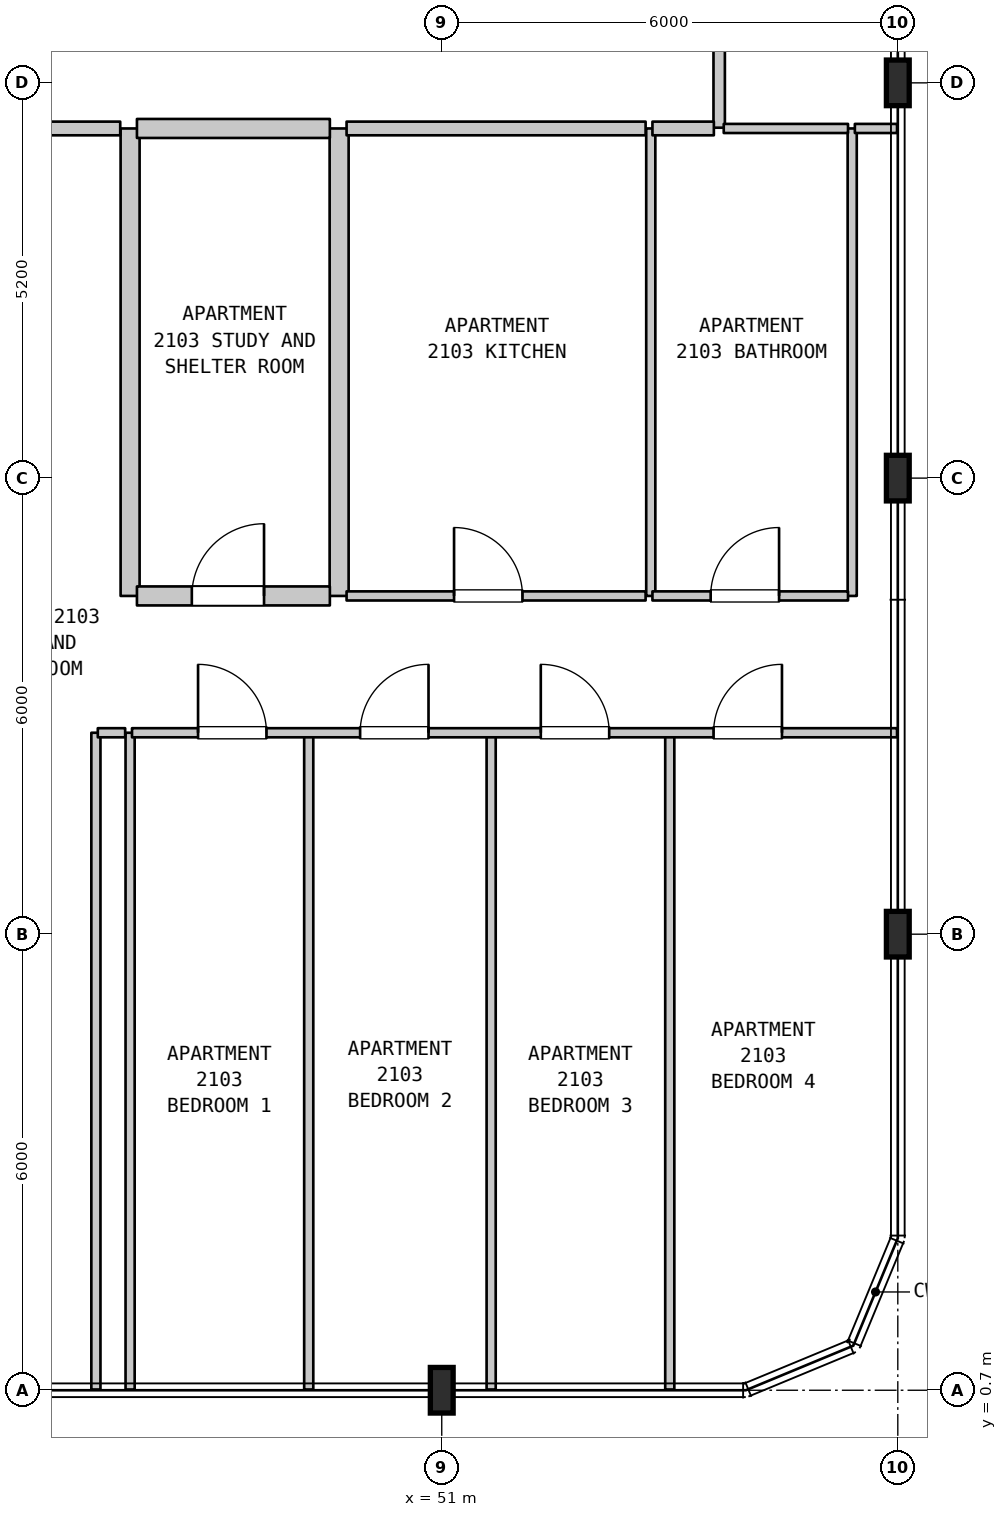
"""IFC4 building model, lengths in metres.
Left out: names, types, materials, properties, quantities, classifications, styles, units other than length and angle.
Written with IfcOpenShell. Run it as: python <this file> out.ifc"""

import sys

from ifc_helpers import new_model, si_unit, direction, frame, frame_2d, origin, origin_2d, place, context, subcontext, project, spatial, rectangle, i_section, extrude, element, fill, save


model = new_model("IFC4")
c1 = context("Model", 3, precision=1e-05, world=origin(), true_north=direction((0.0, 1.0)))
c2 = subcontext(c1, "Body", "Model", "MODEL_VIEW")
j1 = project(units=[si_unit("LENGTHUNIT", "METRE"), si_unit("PLANEANGLEUNIT", "RADIAN")], contexts=[c1])
p1 = place(None, origin())
s1 = spatial("IfcSite", under=j1, at=p1, CompositionType="ELEMENT")
p2 = place(p1, origin())
s2 = spatial("IfcBuilding", under=s1, at=p2, CompositionType="ELEMENT")
p3 = place(p2, frame((0.0, 0.0, 90.9)))
s3 = spatial("IfcBuildingStorey", under=s2, at=p3, CompositionType="ELEMENT", Elevation=90.9)
for number, where, z_axis, x_axis in (
    (1, (51.0, 0.7, 0.0), (0.0, 0.0, 1.0), (1.0, 0.0, 0.0)),
    (2, (57.0, 6.7, 0.0), (0.0, 0.0, 1.0), (1.0, 0.0, 0.0)),
    (3, (57.0, 12.7, 0.0), (0.0, 0.0, 1.0), (1.0, 0.0, 0.0)),
    (4, (57.0, 17.9, 0.0), (0.0, 0.0, 1.0), (1.0, 0.0, 0.0)),
):
    element("IfcColumn", number, at=place(p3, frame(where, z_axis=z_axis, x_axis=x_axis)), inside=s3, PredefinedType="COLUMN", context=c2, shape_type="SweptSolid", body=[
        extrude(i_section(OverallWidth=0.3, OverallDepth=0.6, WebThickness=0.015, FlangeThickness=0.03, FilletRadius=0.027, at=origin_2d()), origin(), (0.0, 0.0, 1.0), 3.7),
    ])
for number, where, z_axis, x_axis in (
    (5, (46.45, 0.71, 0.0), (0.0, 0.0, 1.0), (0.0, 1.0, 0.0)),
    (6, (46.9, 0.71, 0.0), (0.0, 0.0, 1.0), (0.0, 1.0, 0.0)),
):
    element("IfcWall", number, at=place(p3, frame(where, z_axis=z_axis, x_axis=x_axis)), inside=s3, PredefinedType="PARTITIONING", context=c2, shape_type="SweptSolid", body=[
        extrude(rectangle(XDim=8.64, YDim=0.12, at=frame_2d((4.32, 0.0))), origin(), (0.0, 0.0, 1.0), 3.385),
    ])
p4 = place(p3, frame((46.9, 11.15, 0.0), z_axis=(0.0, 0.0, 1.0), x_axis=(0.0, 1.0, 0.0)))
e7 = element("IfcWall", 7, at=p4, inside=s3, PredefinedType="STANDARD", context=c2, shape_type="SweptSolid", body=[
    extrude(rectangle(XDim=6.15, YDim=0.25, at=frame_2d((3.075, 0.0))), origin(), (0.0, 0.0, 1.0), 3.385),
])
p5 = place(p3, frame((49.25, 0.71, 0.0), z_axis=(0.0, 0.0, 1.0), x_axis=(0.0, 1.0, 0.0)))
e8 = element("IfcWall", 8, at=p5, inside=s3, PredefinedType="PARTITIONING", context=c2, shape_type="SweptSolid", body=[
    extrude(rectangle(XDim=8.64, YDim=0.12, at=frame_2d((4.32, 0.0))), origin(), (0.0, 0.0, 1.0), 3.385),
])
p6 = place(p3, frame((49.65, 11.15, 0.0), z_axis=(0.0, 0.0, 1.0), x_axis=(0.0, 1.0, 0.0)))
e9 = element("IfcWall", 9, at=p6, inside=s3, PredefinedType="STANDARD", context=c2, shape_type="SweptSolid", body=[
    extrude(rectangle(XDim=6.15, YDim=0.25, at=frame_2d((3.075, 0.0))), origin(), (0.0, 0.0, 1.0), 3.385),
])
p7 = place(p3, frame((51.65, 0.71, 0.0), z_axis=(0.0, 0.0, 1.0), x_axis=(0.0, 1.0, 0.0)))
e10 = element("IfcWall", 10, at=p7, inside=s3, PredefinedType="PARTITIONING", context=c2, shape_type="SweptSolid", body=[
    extrude(rectangle(XDim=8.64, YDim=0.12, at=frame_2d((4.32, 0.0))), origin(), (0.0, 0.0, 1.0), 3.385),
])
p8 = place(p3, frame((53.75, 11.15, 0.0), z_axis=(0.0, 0.0, 1.0), x_axis=(0.0, 1.0, 0.0)))
e11 = element("IfcWall", 11, at=p8, inside=s3, PredefinedType="PARTITIONING", context=c2, shape_type="SweptSolid", body=[
    extrude(rectangle(XDim=6.15, YDim=0.12, at=frame_2d((3.075, 0.0))), origin(), (0.0, 0.0, 1.0), 3.385),
])
p9 = place(p3, frame((54.0, 0.71, 0.0), z_axis=(0.0, 0.0, 1.0), x_axis=(0.0, 1.0, 0.0)))
e12 = element("IfcWall", 12, at=p9, inside=s3, PredefinedType="PARTITIONING", context=c2, shape_type="SweptSolid", body=[
    extrude(rectangle(XDim=8.64, YDim=0.12, at=frame_2d((4.32, 0.0))), origin(), (0.0, 0.0, 1.0), 3.385),
])
p10 = place(p3, frame((54.65, 17.31, 0.0), z_axis=(0.0, 0.0, 1.0), x_axis=(0.0, 1.0, 0.0)))
e13 = element("IfcWall", 13, at=p10, inside=s3, PredefinedType="STANDARD", context=c2, shape_type="SweptSolid", body=[
    extrude(rectangle(XDim=2.19, YDim=0.15, at=frame_2d((1.095, 0.0))), origin(), (0.0, 0.0, 1.0), 3.385),
])
p11 = place(p3, frame((56.4, 11.15, 0.0), z_axis=(0.0, 0.0, 1.0), x_axis=(0.0, 1.0, 0.0)))
e14 = element("IfcWall", 14, at=p11, inside=s3, PredefinedType="PARTITIONING", context=c2, shape_type="SweptSolid", body=[
    extrude(rectangle(XDim=6.15, YDim=0.12, at=frame_2d((3.075, 0.0))), origin(), (0.0, 0.0, 1.0), 3.385),
])
p12 = place(p3, frame((46.475, 9.35, 0.0), z_axis=(0.0, 0.0, 1.0), x_axis=(1.0, 0.0, 0.0)))
e15 = element("IfcWall", 15, at=p12, inside=s3, PredefinedType="PARTITIONING", context=c2, shape_type="SweptSolid", body=[
    extrude(rectangle(XDim=0.36, YDim=0.12, at=frame_2d((0.18, 0.0))), origin(), (0.0, 0.0, 1.0), 3.385),
])
p13 = place(p3, frame((46.925, 9.35, 0.0), z_axis=(0.0, 0.0, 1.0), x_axis=(1.0, 0.0, 0.0)))
e16 = element("IfcWall", 16, at=p13, inside=s3, PredefinedType="PARTITIONING", context=c2, shape_type="SweptSolid", body=[
    extrude(rectangle(XDim=10.065, YDim=0.12, at=frame_2d((5.032, 0.0))), origin(), (0.0, 0.0, 1.0), 3.385),
])
p14 = place(p13, frame((0.869, 0.0, 0.0)))
e17 = element("IfcOpeningElement", 17, at=p14, cuts=e16, PredefinedType="OPENING", context=c2, shape_type="SweptSolid", body=[
    extrude(rectangle(XDim=0.9, YDim=2.15, at=frame_2d((0.45, 1.075))), frame((0.0, 0.07, 0.0), z_axis=(0.0, -1.0, 0.0), x_axis=(1.0, 0.0, 0.0)), (0.0, 0.0, 1.0), 0.14),
])
p15 = place(p13, frame((3.001, 0.0, 0.0)))
e18 = element("IfcOpeningElement", 18, at=p15, cuts=e16, PredefinedType="OPENING", context=c2, shape_type="SweptSolid", body=[
    extrude(rectangle(XDim=0.9, YDim=2.15, at=frame_2d((0.45, 1.075))), frame((0.0, 0.07, 0.0), z_axis=(0.0, -1.0, 0.0), x_axis=(1.0, 0.0, 0.0)), (0.0, 0.0, 1.0), 0.14),
])
p16 = place(p13, frame((5.378, 0.0, 0.0)))
e19 = element("IfcOpeningElement", 19, at=p16, cuts=e16, PredefinedType="OPENING", context=c2, shape_type="SweptSolid", body=[
    extrude(rectangle(XDim=0.9, YDim=2.15, at=frame_2d((0.45, 1.075))), frame((0.0, 0.07, 0.0), z_axis=(0.0, -1.0, 0.0), x_axis=(1.0, 0.0, 0.0)), (0.0, 0.0, 1.0), 0.14),
])
p17 = place(p13, frame((7.651, 0.0, 0.0)))
e20 = element("IfcOpeningElement", 20, at=p17, cuts=e16, PredefinedType="OPENING", context=c2, shape_type="SweptSolid", body=[
    extrude(rectangle(XDim=0.9, YDim=2.15, at=frame_2d((0.45, 1.075))), frame((0.0, 0.07, 0.0), z_axis=(0.0, -1.0, 0.0), x_axis=(1.0, 0.0, 0.0)), (0.0, 0.0, 1.0), 0.14),
])
p18 = place(p3, frame((46.99, 11.15, 0.0), z_axis=(0.0, 0.0, 1.0), x_axis=(1.0, 0.0, 0.0)))
e21 = element("IfcWall", 21, at=p18, inside=s3, PredefinedType="STANDARD", context=c2, shape_type="SweptSolid", body=[
    extrude(rectangle(XDim=2.538, YDim=0.25, at=frame_2d((1.269, 0.0))), origin(), (0.0, 0.0, 1.0), 3.385),
])
p19 = place(p18, frame((0.722, 0.0, 0.0)))
e22 = element("IfcOpeningElement", 22, at=p19, cuts=e21, PredefinedType="OPENING", context=c2, shape_type="SweptSolid", body=[
    extrude(rectangle(XDim=0.95, YDim=2.15, at=frame_2d((0.475, 1.075))), frame((0.0, 0.135, 0.0), z_axis=(0.0, -1.0, 0.0), x_axis=(1.0, 0.0, 0.0)), (0.0, 0.0, 1.0), 0.27),
])
p20 = place(p3, frame((49.748, 11.15, 0.0), z_axis=(0.0, 0.0, 1.0), x_axis=(1.0, 0.0, 0.0)))
e23 = element("IfcWall", 23, at=p20, inside=s3, PredefinedType="PARTITIONING", context=c2, shape_type="SweptSolid", body=[
    extrude(rectangle(XDim=3.934, YDim=0.12, at=frame_2d((1.967, 0.0))), origin(), (0.0, 0.0, 1.0), 3.385),
])
p21 = place(p20, frame((1.414, 0.0, 0.0)))
e24 = element("IfcOpeningElement", 24, at=p21, cuts=e23, PredefinedType="OPENING", context=c2, shape_type="SweptSolid", body=[
    extrude(rectangle(XDim=0.9, YDim=2.15, at=frame_2d((0.45, 1.075))), frame((0.0, 0.07, 0.0), z_axis=(0.0, -1.0, 0.0), x_axis=(1.0, 0.0, 0.0)), (0.0, 0.0, 1.0), 0.14),
])
p22 = place(p3, frame((53.772, 11.15, 0.0), z_axis=(0.0, 0.0, 1.0), x_axis=(1.0, 0.0, 0.0)))
e25 = element("IfcWall", 25, at=p22, inside=s3, PredefinedType="PARTITIONING", context=c2, shape_type="SweptSolid", body=[
    extrude(rectangle(XDim=2.573, YDim=0.12, at=frame_2d((1.287, 0.0))), origin(), (0.0, 0.0, 1.0), 3.385),
])
p23 = place(p22, frame((0.766, 0.0, 0.0)))
e26 = element("IfcOpeningElement", 26, at=p23, cuts=e25, PredefinedType="OPENING", context=c2, shape_type="SweptSolid", body=[
    extrude(rectangle(XDim=0.9, YDim=2.1, at=frame_2d((0.45, 1.05))), frame((0.0, 0.07, 0.0), z_axis=(0.0, -1.0, 0.0), x_axis=(1.0, 0.0, 0.0)), (0.0, 0.0, 1.0), 0.14),
])
p24 = place(p3, frame((41.225, 17.3, 0.0), z_axis=(0.0, 0.0, 1.0), x_axis=(1.0, 0.0, 0.0)))
e27 = element("IfcWall", 27, at=p24, inside=s3, PredefinedType="STANDARD", context=c2, shape_type="SweptSolid", body=[
    extrude(rectangle(XDim=5.545, YDim=0.18, at=frame_2d((2.772, 0.0))), origin(), (0.0, 0.0, 1.0), 3.385),
])
p25 = place(p24, frame((2.435, 0.0, 0.0)))
e28 = element("IfcOpeningElement", 28, at=p25, cuts=e27, PredefinedType="OPENING", context=c2, shape_type="SweptSolid", body=[
    extrude(rectangle(XDim=1.0, YDim=2.15, at=frame_2d((0.5, 1.075))), frame((0.0, 0.1, 0.0), z_axis=(0.0, -1.0, 0.0), x_axis=(1.0, 0.0, 0.0)), (0.0, 0.0, 1.0), 0.2),
])
p26 = place(p3, frame((46.99, 17.3, 0.0), z_axis=(0.0, 0.0, 1.0), x_axis=(1.0, 0.0, 0.0)))
e29 = element("IfcWall", 29, at=p26, inside=s3, PredefinedType="STANDARD", context=c2, shape_type="SweptSolid", body=[
    extrude(rectangle(XDim=2.538, YDim=0.25, at=frame_2d((1.269, 0.0))), origin(), (0.0, 0.0, 1.0), 3.385),
])
p27 = place(p3, frame((49.748, 17.3, 0.0), z_axis=(0.0, 0.0, 1.0), x_axis=(1.0, 0.0, 0.0)))
e30 = element("IfcWall", 30, at=p27, inside=s3, PredefinedType="STANDARD", context=c2, shape_type="SweptSolid", body=[
    extrude(rectangle(XDim=3.934, YDim=0.18, at=frame_2d((1.967, 0.0))), origin(), (0.0, 0.0, 1.0), 3.385),
])
p28 = place(p3, frame((53.772, 17.3, 0.0), z_axis=(0.0, 0.0, 1.0), x_axis=(1.0, 0.0, 0.0)))
e31 = element("IfcWall", 31, at=p28, inside=s3, PredefinedType="STANDARD", context=c2, shape_type="SweptSolid", body=[
    extrude(rectangle(XDim=0.808, YDim=0.18, at=frame_2d((0.404, 0.0))), origin(), (0.0, 0.0, 1.0), 3.385),
])
p29 = place(p3, frame((54.71, 17.3, 0.0), z_axis=(0.0, 0.0, 1.0), x_axis=(1.0, 0.0, 0.0)))
e32 = element("IfcWall", 32, at=p29, inside=s3, PredefinedType="PARTITIONING", context=c2, shape_type="SweptSolid", body=[
    extrude(rectangle(XDim=1.635, YDim=0.12, at=frame_2d((0.817, 0.0))), origin(), (0.0, 0.0, 1.0), 3.385),
])
p30 = place(p3, frame((56.435, 17.3, 0.0), z_axis=(0.0, 0.0, 1.0), x_axis=(1.0, 0.0, 0.0)))
e33 = element("IfcWall", 33, at=p30, inside=s3, PredefinedType="PARTITIONING", context=c2, shape_type="SweptSolid", body=[
    extrude(rectangle(XDim=0.555, YDim=0.12, at=frame_2d((0.277, 0.0))), origin(), (0.0, 0.0, 1.0), 3.385),
])
p31 = place(p14, origin())
e34 = element("IfcDoor", 34, at=p31, inside=s3, OperationType="SINGLE_SWING_LEFT", PredefinedType="DOOR", context=c2, shape_type="SweptSolid", body=[
    extrude(rectangle(XDim=0.9, YDim=2.15, at=frame_2d((0.45, 1.075))), frame((0.0, 0.025, 0.0), z_axis=(0.0, -1.0, 0.0), x_axis=(1.0, 0.0, 0.0)), (0.0, 0.0, 1.0), 0.05),
])
fill(e17, e34)
p32 = place(p15, origin())
e35 = element("IfcDoor", 35, at=p32, inside=s3, OperationType="SINGLE_SWING_RIGHT", PredefinedType="DOOR", context=c2, shape_type="SweptSolid", body=[
    extrude(rectangle(XDim=0.9, YDim=2.15, at=frame_2d((0.45, 1.075))), frame((0.0, 0.025, 0.0), z_axis=(0.0, -1.0, 0.0), x_axis=(1.0, 0.0, 0.0)), (0.0, 0.0, 1.0), 0.05),
])
fill(e18, e35)
p33 = place(p16, origin())
e36 = element("IfcDoor", 36, at=p33, inside=s3, OperationType="SINGLE_SWING_LEFT", PredefinedType="DOOR", context=c2, shape_type="SweptSolid", body=[
    extrude(rectangle(XDim=0.9, YDim=2.15, at=frame_2d((0.45, 1.075))), frame((0.0, 0.025, 0.0), z_axis=(0.0, -1.0, 0.0), x_axis=(1.0, 0.0, 0.0)), (0.0, 0.0, 1.0), 0.05),
])
fill(e19, e36)
p34 = place(p17, origin())
e37 = element("IfcDoor", 37, at=p34, inside=s3, OperationType="SINGLE_SWING_RIGHT", PredefinedType="DOOR", context=c2, shape_type="SweptSolid", body=[
    extrude(rectangle(XDim=0.9, YDim=2.15, at=frame_2d((0.45, 1.075))), frame((0.0, 0.025, 0.0), z_axis=(0.0, -1.0, 0.0), x_axis=(1.0, 0.0, 0.0)), (0.0, 0.0, 1.0), 0.05),
])
fill(e20, e37)
p35 = place(p19, origin())
e38 = element("IfcDoor", 38, at=p35, inside=s3, OperationType="SINGLE_SWING_RIGHT", PredefinedType="DOOR", context=c2, shape_type="SweptSolid", body=[
    extrude(rectangle(XDim=0.95, YDim=2.15, at=frame_2d((0.475, 1.075))), frame((0.0, 0.025, 0.0), z_axis=(0.0, -1.0, 0.0), x_axis=(1.0, 0.0, 0.0)), (0.0, 0.0, 1.0), 0.05),
])
fill(e22, e38)
p36 = place(p21, origin())
e39 = element("IfcDoor", 39, at=p36, inside=s3, OperationType="SINGLE_SWING_LEFT", PredefinedType="DOOR", context=c2, shape_type="SweptSolid", body=[
    extrude(rectangle(XDim=0.9, YDim=2.15, at=frame_2d((0.45, 1.075))), frame((0.0, 0.025, 0.0), z_axis=(0.0, -1.0, 0.0), x_axis=(1.0, 0.0, 0.0)), (0.0, 0.0, 1.0), 0.05),
])
fill(e24, e39)
p37 = place(p23, origin())
e40 = element("IfcDoor", 40, at=p37, inside=s3, OperationType="SINGLE_SWING_RIGHT", PredefinedType="DOOR", context=c2, shape_type="SweptSolid", body=[
    extrude(rectangle(XDim=0.9, YDim=2.1, at=frame_2d((0.45, 1.05))), frame((0.0, 0.025, 0.0), z_axis=(0.0, -1.0, 0.0), x_axis=(1.0, 0.0, 0.0)), (0.0, 0.0, 1.0), 0.05),
])
fill(e26, e40)
save(model, sys.argv[1])
